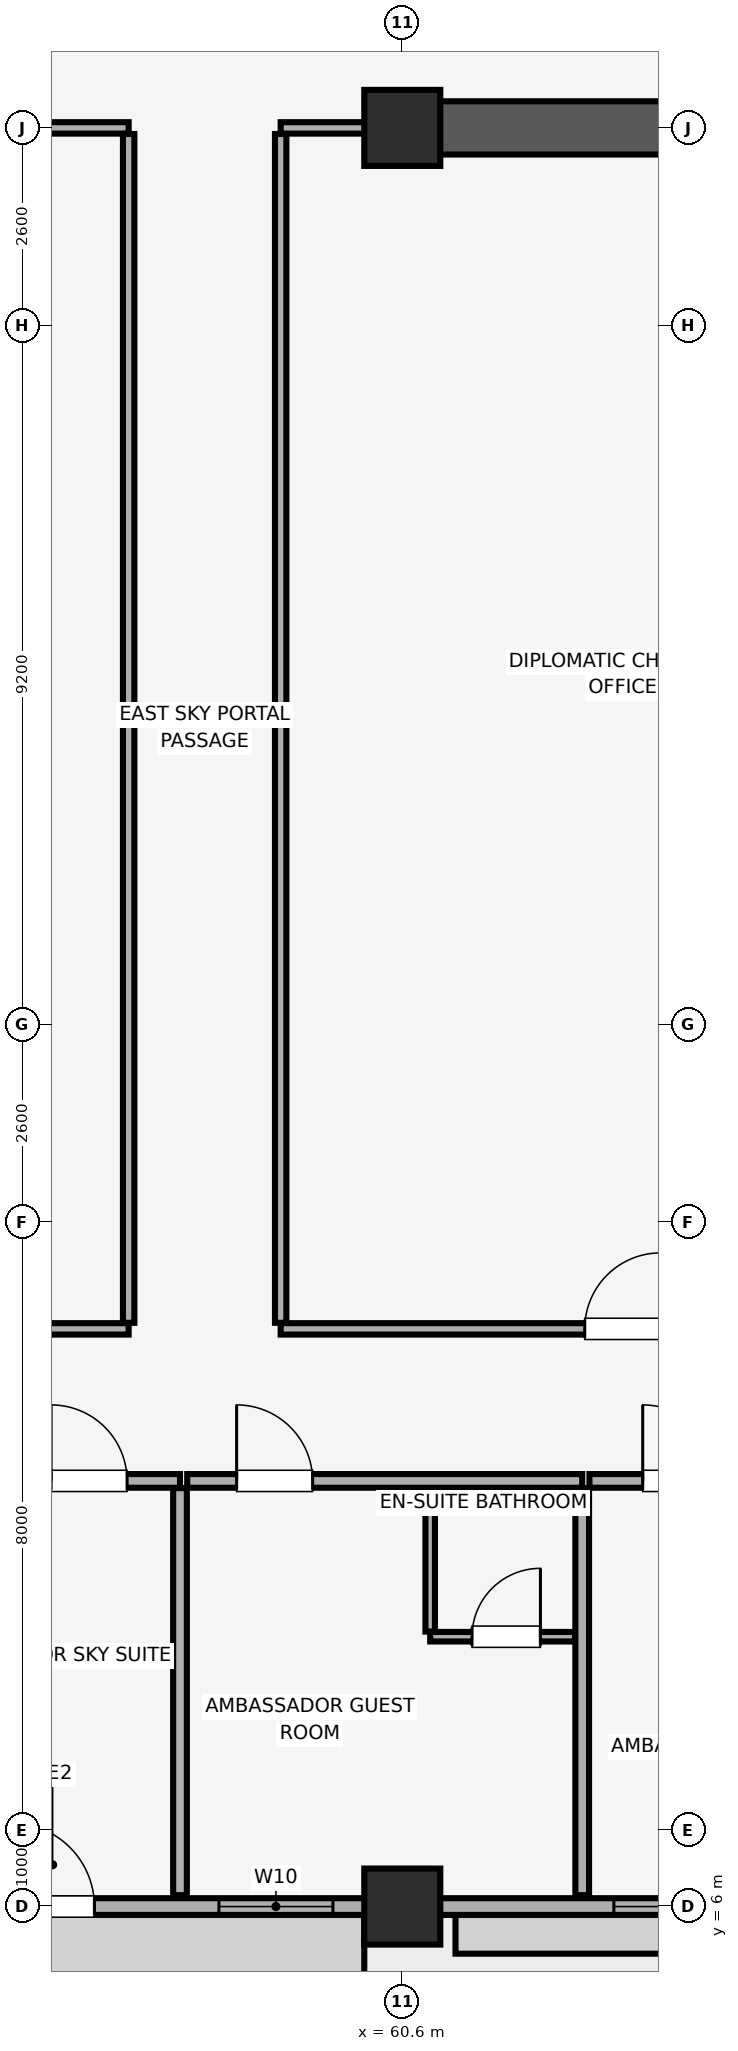
"""IFC4 building model, lengths in metres.
Left out: names, types, materials, properties, quantities, classifications, styles, units other than length and angle.
Written with IfcOpenShell. Run it as: python <this file> out.ifc"""

import sys

from ifc_helpers import new_model, si_unit, direction, frame, frame_2d, origin, origin_2d, place, context, subcontext, project, spatial, rectangle, extrude, element, fill, save


model = new_model("IFC4")
c1 = context("Model", 3, precision=1e-05, world=origin(), true_north=direction((0.0, 1.0)))
c2 = subcontext(c1, "Body", "Model", "MODEL_VIEW")
j1 = project(units=[si_unit("LENGTHUNIT", "METRE"), si_unit("PLANEANGLEUNIT", "RADIAN")], contexts=[c1])
p1 = place(None, origin())
s1 = spatial("IfcSite", under=j1, at=p1, CompositionType="ELEMENT")
p2 = place(p1, origin())
s2 = spatial("IfcBuilding", under=s1, at=p2, CompositionType="ELEMENT")
p3 = place(p2, frame((0.0, 0.0, 229.15)))
s3 = spatial("IfcBuildingStorey", under=s2, at=p3, CompositionType="ELEMENT", Elevation=229.15)
for number, where, z_axis, x_axis in (
    (1, (60.6, 6.0, 0.0), (0.0, 0.0, 1.0), (1.0, 0.0, 0.0)),
    (2, (60.6, 29.4, 0.0), (0.0, 0.0, 1.0), (1.0, 0.0, 0.0)),
):
    element("IfcColumn", number, at=place(p3, frame(where, z_axis=z_axis, x_axis=x_axis)), inside=s3, PredefinedType="COLUMN", context=c2, shape_type="SweptSolid", body=[
        extrude(rectangle(XDim=1.0, YDim=1.0, at=origin_2d()), origin(), (0.0, 0.0, 1.0), 3.71),
    ])
p4 = place(p3, frame((9.8, 6.0, 0.0), z_axis=(0.0, 0.0, 1.0), x_axis=(1.0, 0.0, 0.0)))
e3 = element("IfcWall", 3, at=p4, inside=s3, PredefinedType="SOLIDWALL", context=c2, shape_type="SweptSolid", body=[
    extrude(rectangle(XDim=64.4, YDim=0.22, at=frame_2d((32.2, 0.0))), origin(), (0.0, 0.0, 1.0), 2.91),
])
p5 = place(p4, frame((3.25, 0.0, 0.0)))
e4 = element("IfcOpeningElement", 4, at=p5, cuts=e3, PredefinedType="OPENING", context=c2, shape_type="SweptSolid", body=[
    extrude(rectangle(XDim=1.1, YDim=2.15, at=frame_2d((0.55, 1.075))), frame((0.0, 0.12, 0.0), z_axis=(0.0, -1.0, 0.0), x_axis=(1.0, 0.0, 0.0)), (0.0, 0.0, 1.0), 0.24),
])
p6 = place(p4, frame((24.45, 0.0, 0.0)))
e5 = element("IfcOpeningElement", 5, at=p6, cuts=e3, PredefinedType="OPENING", context=c2, shape_type="SweptSolid", body=[
    extrude(rectangle(XDim=1.1, YDim=2.15, at=frame_2d((0.55, 1.075))), frame((0.0, 0.12, 0.0), z_axis=(0.0, -1.0, 0.0), x_axis=(1.0, 0.0, 0.0)), (0.0, 0.0, 1.0), 0.24),
])
p7 = place(p4, frame((45.65, 0.0, 0.0)))
e6 = element("IfcOpeningElement", 6, at=p7, cuts=e3, PredefinedType="OPENING", context=c2, shape_type="SweptSolid", body=[
    extrude(rectangle(XDim=1.1, YDim=2.15, at=frame_2d((0.55, 1.075))), frame((0.0, 0.12, 0.0), z_axis=(0.0, -1.0, 0.0), x_axis=(1.0, 0.0, 0.0)), (0.0, 0.0, 1.0), 0.24),
])
p8 = place(p4, frame((0.825, 0.0, 0.85)))
e7 = element("IfcOpeningElement", 7, at=p8, cuts=e3, PredefinedType="OPENING", context=c2, shape_type="SweptSolid", body=[
    extrude(rectangle(XDim=1.5, YDim=1.4, at=frame_2d((0.75, 0.7))), frame((0.0, 0.12, 0.0), z_axis=(0.0, -1.0, 0.0), x_axis=(1.0, 0.0, 0.0)), (0.0, 0.0, 1.0), 0.24),
])
p9 = place(p4, frame((7.217, 0.0, 0.85)))
e8 = element("IfcOpeningElement", 8, at=p9, cuts=e3, PredefinedType="OPENING", context=c2, shape_type="SweptSolid", body=[
    extrude(rectangle(XDim=3.2, YDim=1.85, at=frame_2d((1.6, 0.925))), frame((0.0, 0.12, 0.0), z_axis=(0.0, -1.0, 0.0), x_axis=(1.0, 0.0, 0.0)), (0.0, 0.0, 1.0), 0.24),
])
p10 = place(p4, frame((11.267, 0.0, 0.85)))
e9 = element("IfcOpeningElement", 9, at=p10, cuts=e3, PredefinedType="OPENING", context=c2, shape_type="SweptSolid", body=[
    extrude(rectangle(XDim=1.5, YDim=1.4, at=frame_2d((0.75, 0.7))), frame((0.0, 0.12, 0.0), z_axis=(0.0, -1.0, 0.0), x_axis=(1.0, 0.0, 0.0)), (0.0, 0.0, 1.0), 0.24),
])
p11 = place(p4, frame((16.663, 0.0, 0.85)))
e10 = element("IfcOpeningElement", 10, at=p11, cuts=e3, PredefinedType="OPENING", context=c2, shape_type="SweptSolid", body=[
    extrude(rectangle(XDim=3.2, YDim=1.85, at=frame_2d((1.6, 0.925))), frame((0.0, 0.12, 0.0), z_axis=(0.0, -1.0, 0.0), x_axis=(1.0, 0.0, 0.0)), (0.0, 0.0, 1.0), 0.24),
])
p12 = place(p4, frame((22.098, 0.0, 0.85)))
e11 = element("IfcOpeningElement", 11, at=p12, cuts=e3, PredefinedType="OPENING", context=c2, shape_type="SweptSolid", body=[
    extrude(rectangle(XDim=1.5, YDim=1.4, at=frame_2d((0.75, 0.7))), frame((0.0, 0.12, 0.0), z_axis=(0.0, -1.0, 0.0), x_axis=(1.0, 0.0, 0.0)), (0.0, 0.0, 1.0), 0.24),
])
p13 = place(p4, frame((29.0, 0.0, 0.85)))
e12 = element("IfcOpeningElement", 12, at=p13, cuts=e3, PredefinedType="OPENING", context=c2, shape_type="SweptSolid", body=[
    extrude(rectangle(XDim=2.4, YDim=1.5, at=frame_2d((1.2, 0.75))), frame((0.0, 0.12, 0.0), z_axis=(0.0, -1.0, 0.0), x_axis=(1.0, 0.0, 0.0)), (0.0, 0.0, 1.0), 0.24),
])
p14 = place(p4, frame((32.4, 0.0, 0.85)))
e13 = element("IfcOpeningElement", 13, at=p14, cuts=e3, PredefinedType="OPENING", context=c2, shape_type="SweptSolid", body=[
    extrude(rectangle(XDim=3.2, YDim=1.85, at=frame_2d((1.6, 0.925))), frame((0.0, 0.12, 0.0), z_axis=(0.0, -1.0, 0.0), x_axis=(1.0, 0.0, 0.0)), (0.0, 0.0, 1.0), 0.24),
])
p15 = place(p4, frame((38.138, 0.0, 0.85)))
e14 = element("IfcOpeningElement", 14, at=p15, cuts=e3, PredefinedType="OPENING", context=c2, shape_type="SweptSolid", body=[
    extrude(rectangle(XDim=3.6, YDim=1.75, at=frame_2d((1.8, 0.875))), frame((0.0, 0.12, 0.0), z_axis=(0.0, -1.0, 0.0), x_axis=(1.0, 0.0, 0.0)), (0.0, 0.0, 1.0), 0.24),
])
p16 = place(p4, frame((48.387, 0.0, 0.85)))
e15 = element("IfcOpeningElement", 15, at=p16, cuts=e3, PredefinedType="OPENING", context=c2, shape_type="SweptSolid", body=[
    extrude(rectangle(XDim=1.5, YDim=1.4, at=frame_2d((0.75, 0.7))), frame((0.0, 0.12, 0.0), z_axis=(0.0, -1.0, 0.0), x_axis=(1.0, 0.0, 0.0)), (0.0, 0.0, 1.0), 0.24),
])
p17 = place(p4, frame((53.583, 0.0, 0.85)))
e16 = element("IfcOpeningElement", 16, at=p17, cuts=e3, PredefinedType="OPENING", context=c2, shape_type="SweptSolid", body=[
    extrude(rectangle(XDim=3.6, YDim=1.75, at=frame_2d((1.8, 0.875))), frame((0.0, 0.12, 0.0), z_axis=(0.0, -1.0, 0.0), x_axis=(1.0, 0.0, 0.0)), (0.0, 0.0, 1.0), 0.24),
])
p18 = place(p4, frame((59.695, 0.0, 0.85)))
e17 = element("IfcOpeningElement", 17, at=p18, cuts=e3, PredefinedType="OPENING", context=c2, shape_type="SweptSolid", body=[
    extrude(rectangle(XDim=3.6, YDim=1.75, at=frame_2d((1.8, 0.875))), frame((0.0, 0.12, 0.0), z_axis=(0.0, -1.0, 0.0), x_axis=(1.0, 0.0, 0.0)), (0.0, 0.0, 1.0), 0.24),
])
p19 = place(p3, frame((60.4, 29.4, 0.0), z_axis=(0.0, 0.0, 1.0), x_axis=(1.0, 0.0, 0.0)))
e18 = element("IfcWall", 18, at=p19, inside=s3, PredefinedType="SHEAR", context=c2, shape_type="SweptSolid", body=[
    extrude(rectangle(XDim=7.045, YDim=0.7, at=frame_2d((3.522, 0.0))), origin(), (0.0, 0.0, 1.0), 3.71),
])
p20 = place(p3, frame((52.479, 11.6, 0.0), z_axis=(0.0, 0.0, 1.0), x_axis=(1.0, 0.0, 0.0)))
e19 = element("IfcWall", 19, at=p20, inside=s3, PredefinedType="PARTITIONING", context=c2, shape_type="SweptSolid", body=[
    extrude(rectangle(XDim=5.197, YDim=0.18, at=frame_2d((2.598, 0.0))), origin(), (0.0, 0.0, 1.0), 3.71),
])
p21 = place(p20, frame((3.501, 0.0, 0.0)))
e20 = element("IfcOpeningElement", 20, at=p21, cuts=e19, PredefinedType="OPENING", context=c2, shape_type="SweptSolid", body=[
    extrude(rectangle(XDim=1.0, YDim=2.15, at=frame_2d((0.5, 1.075))), frame((0.0, 0.1, 0.0), z_axis=(0.0, -1.0, 0.0), x_axis=(1.0, 0.0, 0.0)), (0.0, 0.0, 1.0), 0.2),
])
p22 = place(p3, frame((57.676, 6.15, 0.0), z_axis=(0.0, 0.0, 1.0), x_axis=(0.0, 1.0, 0.0)))
e21 = element("IfcWall", 21, at=p22, inside=s3, PredefinedType="PARTITIONING", context=c2, shape_type="SweptSolid", body=[
    extrude(rectangle(XDim=5.355, YDim=0.18, at=frame_2d((2.677, 0.0))), origin(), (0.0, 0.0, 1.0), 3.71),
])
p23 = place(p3, frame((57.771, 11.6, 0.0), z_axis=(0.0, 0.0, 1.0), x_axis=(1.0, 0.0, 0.0)))
e22 = element("IfcWall", 22, at=p23, inside=s3, PredefinedType="PARTITIONING", context=c2, shape_type="SweptSolid", body=[
    extrude(rectangle(XDim=5.197, YDim=0.18, at=frame_2d((2.598, 0.0))), origin(), (0.0, 0.0, 1.0), 3.71),
])
p24 = place(p23, frame((0.65, 0.0, 0.0)))
e23 = element("IfcOpeningElement", 23, at=p24, cuts=e22, PredefinedType="OPENING", context=c2, shape_type="SweptSolid", body=[
    extrude(rectangle(XDim=1.0, YDim=2.15, at=frame_2d((0.5, 1.075))), frame((0.0, 0.1, 0.0), z_axis=(0.0, -1.0, 0.0), x_axis=(1.0, 0.0, 0.0)), (0.0, 0.0, 1.0), 0.2),
])
p25 = place(p3, frame((62.967, 6.15, 0.0), z_axis=(0.0, 0.0, 1.0), x_axis=(0.0, 1.0, 0.0)))
e24 = element("IfcWall", 24, at=p25, inside=s3, PredefinedType="PARTITIONING", context=c2, shape_type="SweptSolid", body=[
    extrude(rectangle(XDim=5.355, YDim=0.18, at=frame_2d((2.677, 0.0))), origin(), (0.0, 0.0, 1.0), 3.71),
])
p26 = place(p3, frame((60.967, 9.55, 0.0), z_axis=(0.0, 0.0, 1.0), x_axis=(1.0, 0.0, 0.0)))
e25 = element("IfcWall", 25, at=p26, inside=s3, PredefinedType="PARTITIONING", context=c2, shape_type="SweptSolid", body=[
    extrude(rectangle(XDim=1.905, YDim=0.125, at=frame_2d((0.953, 0.0))), origin(), (0.0, 0.0, 1.0), 3.71),
])
p27 = place(p26, frame((0.55, 0.0, 0.0)))
e26 = element("IfcOpeningElement", 26, at=p27, cuts=e25, PredefinedType="OPENING", context=c2, shape_type="SweptSolid", body=[
    extrude(rectangle(XDim=0.9, YDim=2.1, at=frame_2d((0.45, 1.05))), frame((0.0, 0.073, 0.0), z_axis=(0.0, -1.0, 0.0), x_axis=(1.0, 0.0, 0.0)), (0.0, 0.0, 1.0), 0.145),
])
p28 = place(p3, frame((60.967, 9.617, 0.0), z_axis=(0.0, 0.0, 1.0), x_axis=(0.0, 1.0, 0.0)))
e27 = element("IfcWall", 27, at=p28, inside=s3, PredefinedType="PARTITIONING", context=c2, shape_type="SweptSolid", body=[
    extrude(rectangle(XDim=1.887, YDim=0.125, at=frame_2d((0.944, 0.0))), origin(), (0.0, 0.0, 1.0), 3.71),
])
p29 = place(p3, frame((63.062, 11.6, 0.0), z_axis=(0.0, 0.0, 1.0), x_axis=(1.0, 0.0, 0.0)))
e28 = element("IfcWall", 28, at=p29, inside=s3, PredefinedType="PARTITIONING", context=c2, shape_type="SweptSolid", body=[
    extrude(rectangle(XDim=5.396, YDim=0.18, at=frame_2d((2.698, 0.0))), origin(), (0.0, 0.0, 1.0), 3.71),
])
p30 = place(p29, frame((0.701, 0.0, 0.0)))
e29 = element("IfcOpeningElement", 29, at=p30, cuts=e28, PredefinedType="OPENING", context=c2, shape_type="SweptSolid", body=[
    extrude(rectangle(XDim=1.0, YDim=2.15, at=frame_2d((0.5, 1.075))), frame((0.0, 0.1, 0.0), z_axis=(0.0, -1.0, 0.0), x_axis=(1.0, 0.0, 0.0)), (0.0, 0.0, 1.0), 0.2),
])
p31 = place(p3, frame((42.48, 13.6, 0.0), z_axis=(0.0, 0.0, 1.0), x_axis=(1.0, 0.0, 0.0)))
e30 = element("IfcWall", 30, at=p31, inside=s3, PredefinedType="PARTITIONING", context=c2, shape_type="SweptSolid", body=[
    extrude(rectangle(XDim=14.52, YDim=0.15, at=frame_2d((7.26, 0.0))), origin(), (0.0, 0.0, 1.0), 3.71),
])
p32 = place(p31, frame((6.47, 0.0, 0.0)))
e31 = element("IfcOpeningElement", 31, at=p32, cuts=e30, PredefinedType="OPENING", context=c2, shape_type="SweptSolid", body=[
    extrude(rectangle(XDim=1.5, YDim=2.25, at=frame_2d((0.75, 1.125))), frame((0.0, 0.085, 0.0), z_axis=(0.0, -1.0, 0.0), x_axis=(1.0, 0.0, 0.0)), (0.0, 0.0, 1.0), 0.17),
])
p33 = place(p3, frame((53.61, 29.4, 0.0), z_axis=(0.0, 0.0, 1.0), x_axis=(1.0, 0.0, 0.0)))
e32 = element("IfcWall", 32, at=p33, inside=s3, PredefinedType="PARTITIONING", context=c2, shape_type="SweptSolid", body=[
    extrude(rectangle(XDim=3.39, YDim=0.15, at=frame_2d((1.695, 0.0))), origin(), (0.0, 0.0, 1.0), 2.61),
])
p34 = place(p3, frame((57.0, 13.68, 0.0), z_axis=(0.0, 0.0, 1.0), x_axis=(0.0, 1.0, 0.0)))
e33 = element("IfcWall", 33, at=p34, inside=s3, PredefinedType="PARTITIONING", context=c2, shape_type="SweptSolid", body=[
    extrude(rectangle(XDim=15.64, YDim=0.15, at=frame_2d((7.82, 0.0))), origin(), (0.0, 0.0, 1.0), 3.26),
])
p35 = place(p3, frame((59.0, 13.6, 0.0), z_axis=(0.0, 0.0, 1.0), x_axis=(1.0, 0.0, 0.0)))
e34 = element("IfcWall", 34, at=p35, inside=s3, PredefinedType="PARTITIONING", context=c2, shape_type="SweptSolid", body=[
    extrude(rectangle(XDim=9.0, YDim=0.15, at=frame_2d((4.5, 0.0))), origin(), (0.0, 0.0, 1.0), 3.71),
])
p36 = place(p35, frame((4.0, 0.0, 0.0)))
e35 = element("IfcOpeningElement", 35, at=p36, cuts=e34, PredefinedType="OPENING", context=c2, shape_type="SweptSolid", body=[
    extrude(rectangle(XDim=1.0, YDim=2.15, at=frame_2d((0.5, 1.075))), frame((0.0, 0.085, 0.0), z_axis=(0.0, -1.0, 0.0), x_axis=(1.0, 0.0, 0.0)), (0.0, 0.0, 1.0), 0.17),
])
p37 = place(p3, frame((59.0, 29.4, 0.0), z_axis=(0.0, 0.0, 1.0), x_axis=(1.0, 0.0, 0.0)))
e36 = element("IfcWall", 36, at=p37, inside=s3, PredefinedType="PARTITIONING", context=c2, shape_type="SweptSolid", body=[
    extrude(rectangle(XDim=1.39, YDim=0.15, at=frame_2d((0.695, 0.0))), origin(), (0.0, 0.0, 1.0), 2.61),
])
p38 = place(p3, frame((59.0, 13.68, 0.0), z_axis=(0.0, 0.0, 1.0), x_axis=(0.0, 1.0, 0.0)))
e37 = element("IfcWall", 37, at=p38, inside=s3, PredefinedType="PARTITIONING", context=c2, shape_type="SweptSolid", body=[
    extrude(rectangle(XDim=15.64, YDim=0.15, at=frame_2d((7.82, 0.0))), origin(), (0.0, 0.0, 1.0), 3.08),
])
p39 = place(p7, origin())
e38 = element("IfcDoor", 38, at=p39, inside=s3, OperationType="SINGLE_SWING_LEFT", PredefinedType="DOOR", context=c2, shape_type="SweptSolid", body=[
    extrude(rectangle(XDim=1.1, YDim=2.15, at=frame_2d((0.55, 1.075))), frame((0.0, 0.025, 0.0), z_axis=(0.0, -1.0, 0.0), x_axis=(1.0, 0.0, 0.0)), (0.0, 0.0, 1.0), 0.05),
])
fill(e6, e38)
p40 = place(p16, origin())
e39 = element("IfcWindow", 39, at=p40, inside=s3, PartitioningType="SINGLE_PANEL", PredefinedType="WINDOW", context=c2, shape_type="SweptSolid", body=[
    extrude(rectangle(XDim=1.5, YDim=1.4, at=frame_2d((0.75, 0.7))), frame((0.0, 0.03, 0.0), z_axis=(0.0, -1.0, 0.0), x_axis=(1.0, 0.0, 0.0)), (0.0, 0.0, 1.0), 0.06),
])
fill(e15, e39)
p41 = place(p17, origin())
e40 = element("IfcWindow", 40, at=p41, inside=s3, PartitioningType="SINGLE_PANEL", PredefinedType="WINDOW", context=c2, shape_type="SweptSolid", body=[
    extrude(rectangle(XDim=3.6, YDim=1.75, at=frame_2d((1.8, 0.875))), frame((0.0, 0.03, 0.0), z_axis=(0.0, -1.0, 0.0), x_axis=(1.0, 0.0, 0.0)), (0.0, 0.0, 1.0), 0.06),
])
fill(e16, e40)
p42 = place(p21, origin())
e41 = element("IfcDoor", 41, at=p42, inside=s3, OperationType="SINGLE_SWING_LEFT", PredefinedType="DOOR", context=c2, shape_type="SweptSolid", body=[
    extrude(rectangle(XDim=1.0, YDim=2.15, at=frame_2d((0.5, 1.075))), frame((0.0, 0.025, 0.0), z_axis=(0.0, -1.0, 0.0), x_axis=(1.0, 0.0, 0.0)), (0.0, 0.0, 1.0), 0.05),
])
fill(e20, e41)
p43 = place(p24, origin())
e42 = element("IfcDoor", 42, at=p43, inside=s3, OperationType="SINGLE_SWING_LEFT", PredefinedType="DOOR", context=c2, shape_type="SweptSolid", body=[
    extrude(rectangle(XDim=1.0, YDim=2.15, at=frame_2d((0.5, 1.075))), frame((0.0, 0.025, 0.0), z_axis=(0.0, -1.0, 0.0), x_axis=(1.0, 0.0, 0.0)), (0.0, 0.0, 1.0), 0.05),
])
fill(e23, e42)
p44 = place(p27, origin())
e43 = element("IfcDoor", 43, at=p44, inside=s3, OperationType="SINGLE_SWING_RIGHT", PredefinedType="DOOR", context=c2, shape_type="SweptSolid", body=[
    extrude(rectangle(XDim=0.9, YDim=2.1, at=frame_2d((0.45, 1.05))), frame((0.0, 0.025, 0.0), z_axis=(0.0, -1.0, 0.0), x_axis=(1.0, 0.0, 0.0)), (0.0, 0.0, 1.0), 0.05),
])
fill(e26, e43)
p45 = place(p30, origin())
e44 = element("IfcDoor", 44, at=p45, inside=s3, OperationType="SINGLE_SWING_LEFT", PredefinedType="DOOR", context=c2, shape_type="SweptSolid", body=[
    extrude(rectangle(XDim=1.0, YDim=2.15, at=frame_2d((0.5, 1.075))), frame((0.0, 0.025, 0.0), z_axis=(0.0, -1.0, 0.0), x_axis=(1.0, 0.0, 0.0)), (0.0, 0.0, 1.0), 0.05),
])
fill(e29, e44)
p46 = place(p36, origin())
e45 = element("IfcDoor", 45, at=p46, inside=s3, OperationType="SINGLE_SWING_RIGHT", PredefinedType="DOOR", context=c2, shape_type="SweptSolid", body=[
    extrude(rectangle(XDim=1.0, YDim=2.15, at=frame_2d((0.5, 1.075))), frame((0.0, 0.025, 0.0), z_axis=(0.0, -1.0, 0.0), x_axis=(1.0, 0.0, 0.0)), (0.0, 0.0, 1.0), 0.05),
])
fill(e35, e45)
save(model, sys.argv[1])
